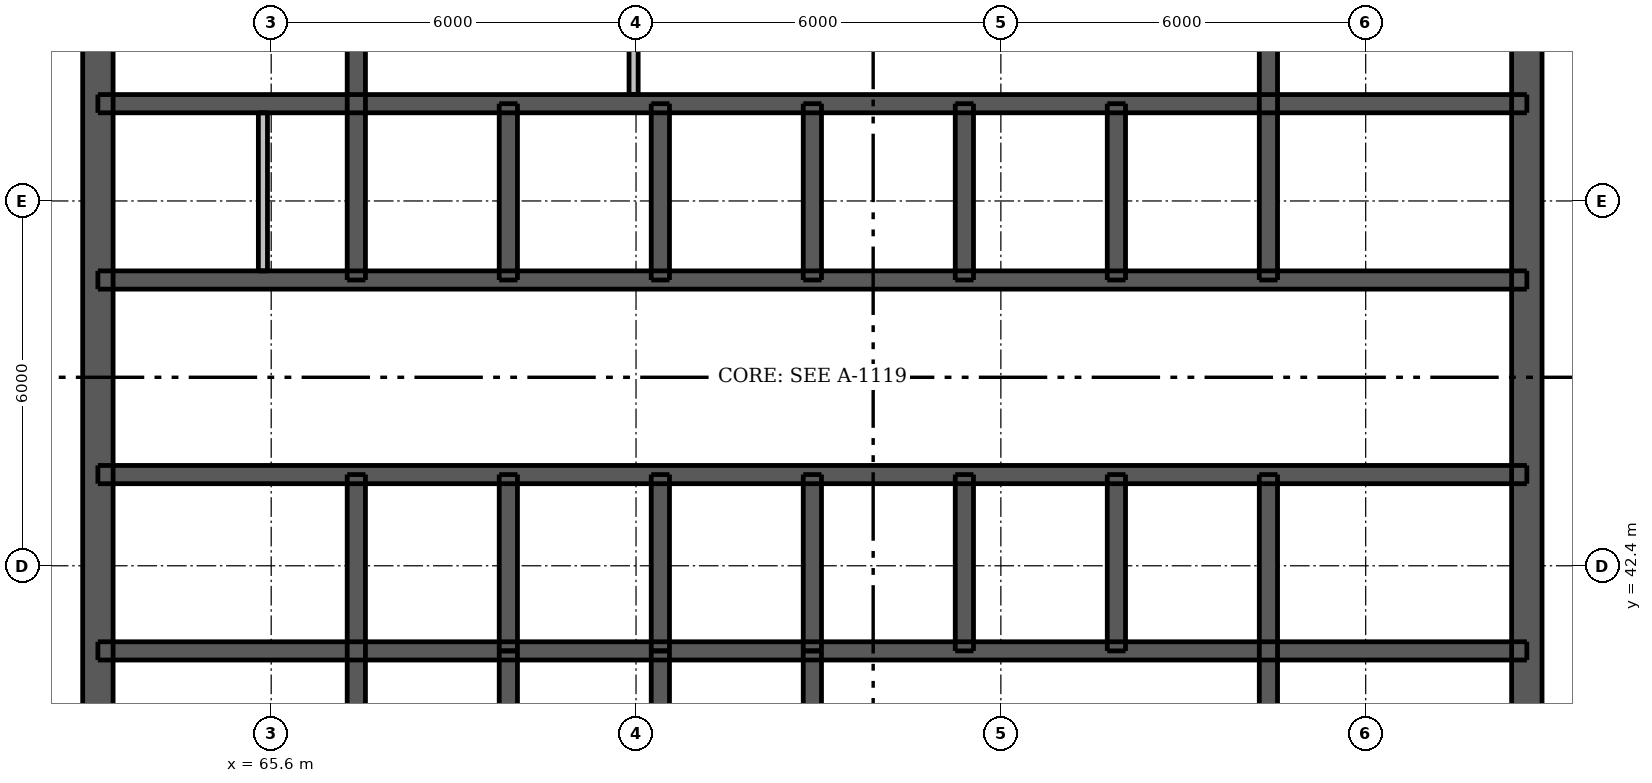
"""IFC4 building model, lengths in metres.
Left out: names, types, materials, properties, quantities, classifications, styles, units other than length and angle.
Written with IfcOpenShell. Run it as: python <this file> out.ifc"""

import sys

from ifc_helpers import new_model, si_unit, direction, frame, frame_2d, origin, place, context, subcontext, project, spatial, rectangle, extrude, element, fill, save


model = new_model("IFC4")
c1 = context("Model", 3, precision=1e-05, world=origin(), true_north=direction((0.0, 1.0)))
c2 = subcontext(c1, "Body", "Model", "MODEL_VIEW")
j1 = project(units=[si_unit("LENGTHUNIT", "METRE"), si_unit("PLANEANGLEUNIT", "RADIAN")], contexts=[c1])
p1 = place(None, origin())
s1 = spatial("IfcSite", under=j1, at=p1, CompositionType="ELEMENT")
p2 = place(p1, origin())
s2 = spatial("IfcBuilding", under=s1, at=p2, CompositionType="ELEMENT")
p3 = place(p2, frame((0.0, 0.0, 271.9)))
s3 = spatial("IfcBuildingStorey", under=s2, at=p3, CompositionType="ELEMENT", Elevation=271.9)
p4 = place(p3, frame((62.75, 33.5, 0.0), z_axis=(0.0, 0.0, 1.0), x_axis=(0.0, 1.0, 0.0)))
e1 = element("IfcWall", 1, at=p4, inside=s3, PredefinedType="SHEAR", context=c2, shape_type="SweptSolid", body=[
    extrude(rectangle(XDim=24.0, YDim=0.5, at=frame_2d((12.0, 0.0))), origin(), (0.0, 0.0, 1.0), 3.05),
])
p5 = place(p4, frame((11.2, 0.0, 0.0)))
e2 = element("IfcOpeningElement", 2, at=p5, cuts=e1, PredefinedType="OPENING", context=c2, shape_type="SweptSolid", body=[
    extrude(rectangle(XDim=1.6, YDim=2.1, at=frame_2d((0.8, 1.05))), frame((0.0, 0.26, 0.0), z_axis=(0.0, -1.0, 0.0), x_axis=(1.0, 0.0, 0.0)), (0.0, 0.0, 1.0), 0.52),
])
p6 = place(p3, frame((86.25, 33.5, 0.0), z_axis=(0.0, 0.0, 1.0), x_axis=(0.0, 1.0, 0.0)))
e3 = element("IfcWall", 3, at=p6, inside=s3, PredefinedType="SHEAR", context=c2, shape_type="SweptSolid", body=[
    extrude(rectangle(XDim=24.0, YDim=0.5, at=frame_2d((12.0, 0.0))), origin(), (0.0, 0.0, 1.0), 3.05),
])
p7 = place(p6, frame((11.2, 0.0, 0.0)))
e4 = element("IfcOpeningElement", 4, at=p7, cuts=e3, PredefinedType="OPENING", context=c2, shape_type="SweptSolid", body=[
    extrude(rectangle(XDim=1.6, YDim=2.1, at=frame_2d((0.8, 1.05))), frame((0.0, 0.26, 0.0), z_axis=(0.0, -1.0, 0.0), x_axis=(1.0, 0.0, 0.0)), (0.0, 0.0, 1.0), 0.52),
])
p8 = place(p3, frame((62.75, 41.0, 0.0), z_axis=(0.0, 0.0, 1.0), x_axis=(1.0, 0.0, 0.0)))
e5 = element("IfcWall", 5, at=p8, inside=s3, PredefinedType="SHEAR", context=c2, shape_type="SweptSolid", body=[
    extrude(rectangle(XDim=23.5, YDim=0.3, at=frame_2d((11.75, 0.0))), origin(), (0.0, 0.0, 1.0), 3.05),
])
p9 = place(p3, frame((62.75, 43.9, 0.0), z_axis=(0.0, 0.0, 1.0), x_axis=(1.0, 0.0, 0.0)))
e6 = element("IfcWall", 6, at=p9, inside=s3, PredefinedType="SHEAR", context=c2, shape_type="SweptSolid", body=[
    extrude(rectangle(XDim=23.5, YDim=0.3, at=frame_2d((11.75, 0.0))), origin(), (0.0, 0.0, 1.0), 3.05),
])
p10 = place(p9, frame((1.725, 0.0, 0.0)))
e7 = element("IfcOpeningElement", 7, at=p10, cuts=e6, PredefinedType="OPENING", context=c2, shape_type="SweptSolid", body=[
    extrude(rectangle(XDim=0.9, YDim=2.1, at=frame_2d((0.45, 1.05))), frame((0.0, 0.16, 0.0), z_axis=(0.0, -1.0, 0.0), x_axis=(1.0, 0.0, 0.0)), (0.0, 0.0, 1.0), 0.32),
])
p11 = place(p9, frame((20.875, 0.0, 0.0)))
e8 = element("IfcOpeningElement", 8, at=p11, cuts=e6, PredefinedType="OPENING", context=c2, shape_type="SweptSolid", body=[
    extrude(rectangle(XDim=0.9, YDim=2.1, at=frame_2d((0.45, 1.05))), frame((0.0, 0.16, 0.0), z_axis=(0.0, -1.0, 0.0), x_axis=(1.0, 0.0, 0.0)), (0.0, 0.0, 1.0), 0.32),
])
p12 = place(p9, frame((7.55, 0.0, 0.0)))
e9 = element("IfcOpeningElement", 9, at=p12, cuts=e6, PredefinedType="OPENING", context=c2, shape_type="SweptSolid", body=[
    extrude(rectangle(XDim=0.9, YDim=2.1, at=frame_2d((0.45, 1.05))), frame((0.0, 0.16, 0.0), z_axis=(0.0, -1.0, 0.0), x_axis=(1.0, 0.0, 0.0)), (0.0, 0.0, 1.0), 0.32),
])
p13 = place(p9, frame((10.05, 0.0, 0.0)))
e10 = element("IfcOpeningElement", 10, at=p13, cuts=e6, PredefinedType="OPENING", context=c2, shape_type="SweptSolid", body=[
    extrude(rectangle(XDim=0.9, YDim=2.1, at=frame_2d((0.45, 1.05))), frame((0.0, 0.16, 0.0), z_axis=(0.0, -1.0, 0.0), x_axis=(1.0, 0.0, 0.0)), (0.0, 0.0, 1.0), 0.32),
])
p14 = place(p9, frame((15.05, 0.0, 0.0)))
e11 = element("IfcOpeningElement", 11, at=p14, cuts=e6, PredefinedType="OPENING", context=c2, shape_type="SweptSolid", body=[
    extrude(rectangle(XDim=0.9, YDim=2.1, at=frame_2d((0.45, 1.05))), frame((0.0, 0.16, 0.0), z_axis=(0.0, -1.0, 0.0), x_axis=(1.0, 0.0, 0.0)), (0.0, 0.0, 1.0), 0.32),
])
p15 = place(p9, frame((17.55, 0.0, 0.0)))
e12 = element("IfcOpeningElement", 12, at=p15, cuts=e6, PredefinedType="OPENING", context=c2, shape_type="SweptSolid", body=[
    extrude(rectangle(XDim=0.9, YDim=2.1, at=frame_2d((0.45, 1.05))), frame((0.0, 0.16, 0.0), z_axis=(0.0, -1.0, 0.0), x_axis=(1.0, 0.0, 0.0)), (0.0, 0.0, 1.0), 0.32),
])
p16 = place(p3, frame((62.75, 47.1, 0.0), z_axis=(0.0, 0.0, 1.0), x_axis=(1.0, 0.0, 0.0)))
e13 = element("IfcWall", 13, at=p16, inside=s3, PredefinedType="SHEAR", context=c2, shape_type="SweptSolid", body=[
    extrude(rectangle(XDim=23.5, YDim=0.3, at=frame_2d((11.75, 0.0))), origin(), (0.0, 0.0, 1.0), 3.05),
])
p17 = place(p16, frame((1.032, 0.0, 0.0)))
e14 = element("IfcOpeningElement", 14, at=p17, cuts=e13, PredefinedType="OPENING", context=c2, shape_type="SweptSolid", body=[
    extrude(rectangle(XDim=0.9, YDim=2.1, at=frame_2d((0.45, 1.05))), frame((0.0, 0.16, 0.0), z_axis=(0.0, -1.0, 0.0), x_axis=(1.0, 0.0, 0.0)), (0.0, 0.0, 1.0), 0.32),
])
p18 = place(p16, frame((3.007, 0.0, 0.0)))
e15 = element("IfcOpeningElement", 15, at=p18, cuts=e13, PredefinedType="OPENING", context=c2, shape_type="SweptSolid", body=[
    extrude(rectangle(XDim=0.8, YDim=2.1, at=frame_2d((0.4, 1.05))), frame((0.0, 0.16, 0.0), z_axis=(0.0, -1.0, 0.0), x_axis=(1.0, 0.0, 0.0)), (0.0, 0.0, 1.0), 0.32),
])
p19 = place(p16, frame((20.875, 0.0, 0.0)))
e16 = element("IfcOpeningElement", 16, at=p19, cuts=e13, PredefinedType="OPENING", context=c2, shape_type="SweptSolid", body=[
    extrude(rectangle(XDim=0.9, YDim=2.1, at=frame_2d((0.45, 1.05))), frame((0.0, 0.16, 0.0), z_axis=(0.0, -1.0, 0.0), x_axis=(1.0, 0.0, 0.0)), (0.0, 0.0, 1.0), 0.32),
])
p20 = place(p16, frame((4.95, 0.0, 0.0)))
e17 = element("IfcOpeningElement", 17, at=p20, cuts=e13, PredefinedType="OPENING", context=c2, shape_type="SweptSolid", body=[
    extrude(rectangle(XDim=1.1, YDim=2.1, at=frame_2d((0.55, 1.05))), frame((0.0, 0.16, 0.0), z_axis=(0.0, -1.0, 0.0), x_axis=(1.0, 0.0, 0.0)), (0.0, 0.0, 1.0), 0.32),
])
p21 = place(p16, frame((7.45, 0.0, 0.0)))
e18 = element("IfcOpeningElement", 18, at=p21, cuts=e13, PredefinedType="OPENING", context=c2, shape_type="SweptSolid", body=[
    extrude(rectangle(XDim=1.1, YDim=2.1, at=frame_2d((0.55, 1.05))), frame((0.0, 0.16, 0.0), z_axis=(0.0, -1.0, 0.0), x_axis=(1.0, 0.0, 0.0)), (0.0, 0.0, 1.0), 0.32),
])
p22 = place(p16, frame((9.95, 0.0, 0.0)))
e19 = element("IfcOpeningElement", 19, at=p22, cuts=e13, PredefinedType="OPENING", context=c2, shape_type="SweptSolid", body=[
    extrude(rectangle(XDim=1.1, YDim=2.1, at=frame_2d((0.55, 1.05))), frame((0.0, 0.16, 0.0), z_axis=(0.0, -1.0, 0.0), x_axis=(1.0, 0.0, 0.0)), (0.0, 0.0, 1.0), 0.32),
])
p23 = place(p16, frame((12.45, 0.0, 0.0)))
e20 = element("IfcOpeningElement", 20, at=p23, cuts=e13, PredefinedType="OPENING", context=c2, shape_type="SweptSolid", body=[
    extrude(rectangle(XDim=1.1, YDim=2.1, at=frame_2d((0.55, 1.05))), frame((0.0, 0.16, 0.0), z_axis=(0.0, -1.0, 0.0), x_axis=(1.0, 0.0, 0.0)), (0.0, 0.0, 1.0), 0.32),
])
p24 = place(p16, frame((14.95, 0.0, 0.0)))
e21 = element("IfcOpeningElement", 21, at=p24, cuts=e13, PredefinedType="OPENING", context=c2, shape_type="SweptSolid", body=[
    extrude(rectangle(XDim=1.1, YDim=2.1, at=frame_2d((0.55, 1.05))), frame((0.0, 0.16, 0.0), z_axis=(0.0, -1.0, 0.0), x_axis=(1.0, 0.0, 0.0)), (0.0, 0.0, 1.0), 0.32),
])
p25 = place(p16, frame((17.45, 0.0, 0.0)))
e22 = element("IfcOpeningElement", 22, at=p25, cuts=e13, PredefinedType="OPENING", context=c2, shape_type="SweptSolid", body=[
    extrude(rectangle(XDim=1.1, YDim=2.1, at=frame_2d((0.55, 1.05))), frame((0.0, 0.16, 0.0), z_axis=(0.0, -1.0, 0.0), x_axis=(1.0, 0.0, 0.0)), (0.0, 0.0, 1.0), 0.32),
])
p26 = place(p3, frame((62.75, 50.0, 0.0), z_axis=(0.0, 0.0, 1.0), x_axis=(1.0, 0.0, 0.0)))
e23 = element("IfcWall", 23, at=p26, inside=s3, PredefinedType="SHEAR", context=c2, shape_type="SweptSolid", body=[
    extrude(rectangle(XDim=23.5, YDim=0.3, at=frame_2d((11.75, 0.0))), origin(), (0.0, 0.0, 1.0), 3.05),
])
p27 = place(p3, frame((67.0, 33.75, 0.0), z_axis=(0.0, 0.0, 1.0), x_axis=(0.0, 1.0, 0.0)))
e24 = element("IfcWall", 24, at=p27, inside=s3, PredefinedType="SHEAR", context=c2, shape_type="SweptSolid", body=[
    extrude(rectangle(XDim=10.15, YDim=0.3, at=frame_2d((5.075, 0.0))), origin(), (0.0, 0.0, 1.0), 3.05),
])
p28 = place(p27, frame((0.45, 0.0, 0.0)))
e25 = element("IfcOpeningElement", 25, at=p28, cuts=e24, PredefinedType="OPENING", context=c2, shape_type="SweptSolid", body=[
    extrude(rectangle(XDim=1.1, YDim=2.1, at=frame_2d((0.55, 1.05))), frame((0.0, 0.16, 0.0), z_axis=(0.0, -1.0, 0.0), x_axis=(1.0, 0.0, 0.0)), (0.0, 0.0, 1.0), 0.32),
])
for number, where, z_axis, x_axis in (
    (26, (67.0, 47.1, 0.0), (0.0, 0.0, 1.0), (0.0, 1.0, 0.0)),
    (27, (82.0, 33.75, 0.0), (0.0, 0.0, 1.0), (0.0, 1.0, 0.0)),
    (28, (82.0, 47.1, 0.0), (0.0, 0.0, 1.0), (0.0, 1.0, 0.0)),
):
    element("IfcWall", number, at=place(p3, frame(where, z_axis=z_axis, x_axis=x_axis)), inside=s3, PredefinedType="SHEAR", context=c2, shape_type="SweptSolid", body=[
        extrude(rectangle(XDim=10.15, YDim=0.3, at=frame_2d((5.075, 0.0))), origin(), (0.0, 0.0, 1.0), 3.05),
    ])
for number, where, z_axis, x_axis in (
    (29, (69.5, 41.0, 0.0), (0.0, 0.0, 1.0), (0.0, 1.0, 0.0)),
    (30, (69.5, 47.1, 0.0), (0.0, 0.0, 1.0), (0.0, 1.0, 0.0)),
    (31, (72.0, 41.0, 0.0), (0.0, 0.0, 1.0), (0.0, 1.0, 0.0)),
    (32, (72.0, 47.1, 0.0), (0.0, 0.0, 1.0), (0.0, 1.0, 0.0)),
    (33, (74.5, 41.0, 0.0), (0.0, 0.0, 1.0), (0.0, 1.0, 0.0)),
    (34, (74.5, 47.1, 0.0), (0.0, 0.0, 1.0), (0.0, 1.0, 0.0)),
    (35, (77.0, 41.0, 0.0), (0.0, 0.0, 1.0), (0.0, 1.0, 0.0)),
    (36, (77.0, 47.1, 0.0), (0.0, 0.0, 1.0), (0.0, 1.0, 0.0)),
    (37, (79.5, 41.0, 0.0), (0.0, 0.0, 1.0), (0.0, 1.0, 0.0)),
    (38, (79.5, 47.1, 0.0), (0.0, 0.0, 1.0), (0.0, 1.0, 0.0)),
    (39, (69.5, 38.1, 0.0), (0.0, 0.0, 1.0), (0.0, 1.0, 0.0)),
    (40, (72.0, 38.1, 0.0), (0.0, 0.0, 1.0), (0.0, 1.0, 0.0)),
    (41, (74.5, 38.1, 0.0), (0.0, 0.0, 1.0), (0.0, 1.0, 0.0)),
):
    element("IfcWall", number, at=place(p3, frame(where, z_axis=z_axis, x_axis=x_axis)), inside=s3, PredefinedType="SHEAR", context=c2, shape_type="SweptSolid", body=[
        extrude(rectangle(XDim=2.9, YDim=0.3, at=frame_2d((1.45, 0.0))), origin(), (0.0, 0.0, 1.0), 3.05),
    ])
p29 = place(p3, frame((65.464, 47.25, 0.0), z_axis=(0.0, 0.0, 1.0), x_axis=(0.0, 1.0, 0.0)))
e42 = element("IfcWall", 42, at=p29, inside=s3, PredefinedType="PLUMBINGWALL", context=c2, shape_type="SweptSolid", body=[
    extrude(rectangle(XDim=2.6, YDim=0.15, at=frame_2d((1.3, 0.0))), origin(), (0.0, 0.0, 1.0), 3.05),
])
p30 = place(p3, frame((71.56, 50.15, 0.0), z_axis=(0.0, 0.0, 1.0), x_axis=(0.0, 1.0, 0.0)))
e43 = element("IfcWall", 43, at=p30, inside=s3, PredefinedType="PLUMBINGWALL", context=c2, shape_type="SweptSolid", body=[
    extrude(rectangle(XDim=6.85, YDim=0.15, at=frame_2d((3.425, 0.0))), origin(), (0.0, 0.0, 1.0), 3.05),
])
p31 = place(p5, origin())
e44 = element("IfcDoor", 44, at=p31, inside=s3, OperationType="DOUBLE_DOOR_SINGLE_SWING", PredefinedType="DOOR", context=c2, shape_type="SweptSolid", body=[
    extrude(rectangle(XDim=1.6, YDim=2.1, at=frame_2d((0.8, 1.05))), frame((0.0, -0.188, 0.0), z_axis=(0.0, -1.0, 0.0), x_axis=(1.0, 0.0, 0.0)), (0.0, 0.0, 1.0), 0.05),
])
fill(e2, e44)
p32 = place(p7, origin())
e45 = element("IfcDoor", 45, at=p32, inside=s3, OperationType="DOUBLE_DOOR_SINGLE_SWING", PredefinedType="DOOR", context=c2, shape_type="SweptSolid", body=[
    extrude(rectangle(XDim=1.6, YDim=2.1, at=frame_2d((0.8, 1.05))), frame((0.0, 0.237, 0.0), z_axis=(0.0, -1.0, 0.0), x_axis=(1.0, 0.0, 0.0)), (0.0, 0.0, 1.0), 0.05),
])
fill(e4, e45)
p33 = place(p10, origin())
e46 = element("IfcDoor", 46, at=p33, inside=s3, OperationType="SINGLE_SWING_LEFT", PredefinedType="DOOR", context=c2, shape_type="SweptSolid", body=[
    extrude(rectangle(XDim=0.9, YDim=2.1, at=frame_2d((0.45, 1.05))), frame((0.0, -0.087, 0.0), z_axis=(0.0, -1.0, 0.0), x_axis=(1.0, 0.0, 0.0)), (0.0, 0.0, 1.0), 0.05),
])
fill(e7, e46)
p34 = place(p11, origin())
e47 = element("IfcDoor", 47, at=p34, inside=s3, OperationType="SINGLE_SWING_LEFT", PredefinedType="DOOR", context=c2, shape_type="SweptSolid", body=[
    extrude(rectangle(XDim=0.9, YDim=2.1, at=frame_2d((0.45, 1.05))), frame((0.0, -0.087, 0.0), z_axis=(0.0, -1.0, 0.0), x_axis=(1.0, 0.0, 0.0)), (0.0, 0.0, 1.0), 0.05),
])
fill(e8, e47)
p35 = place(p17, origin())
e48 = element("IfcDoor", 48, at=p35, inside=s3, OperationType="SINGLE_SWING_LEFT", PredefinedType="DOOR", context=c2, shape_type="SweptSolid", body=[
    extrude(rectangle(XDim=0.9, YDim=2.1, at=frame_2d((0.45, 1.05))), frame((0.0, 0.138, 0.0), z_axis=(0.0, -1.0, 0.0), x_axis=(1.0, 0.0, 0.0)), (0.0, 0.0, 1.0), 0.05),
])
fill(e14, e48)
p36 = place(p18, origin())
e49 = element("IfcDoor", 49, at=p36, inside=s3, OperationType="SINGLE_SWING_RIGHT", PredefinedType="DOOR", context=c2, shape_type="SweptSolid", body=[
    extrude(rectangle(XDim=0.8, YDim=2.1, at=frame_2d((0.4, 1.05))), frame((0.0, 0.138, 0.0), z_axis=(0.0, -1.0, 0.0), x_axis=(1.0, 0.0, 0.0)), (0.0, 0.0, 1.0), 0.05),
])
fill(e15, e49)
p37 = place(p19, origin())
e50 = element("IfcDoor", 50, at=p37, inside=s3, OperationType="SINGLE_SWING_LEFT", PredefinedType="DOOR", context=c2, shape_type="SweptSolid", body=[
    extrude(rectangle(XDim=0.9, YDim=2.1, at=frame_2d((0.45, 1.05))), frame((0.0, 0.138, 0.0), z_axis=(0.0, -1.0, 0.0), x_axis=(1.0, 0.0, 0.0)), (0.0, 0.0, 1.0), 0.05),
])
fill(e16, e50)
p38 = place(p12, origin())
e51 = element("IfcDoor", 51, at=p38, inside=s3, OperationType="SINGLE_SWING_LEFT", PredefinedType="DOOR", context=c2, shape_type="SweptSolid", body=[
    extrude(rectangle(XDim=0.9, YDim=2.1, at=frame_2d((0.45, 1.05))), frame((0.0, -0.087, 0.0), z_axis=(0.0, -1.0, 0.0), x_axis=(1.0, 0.0, 0.0)), (0.0, 0.0, 1.0), 0.05),
])
fill(e9, e51)
p39 = place(p13, origin())
e52 = element("IfcDoor", 52, at=p39, inside=s3, OperationType="SINGLE_SWING_RIGHT", PredefinedType="DOOR", context=c2, shape_type="SweptSolid", body=[
    extrude(rectangle(XDim=0.9, YDim=2.1, at=frame_2d((0.45, 1.05))), frame((0.0, -0.087, 0.0), z_axis=(0.0, -1.0, 0.0), x_axis=(1.0, 0.0, 0.0)), (0.0, 0.0, 1.0), 0.05),
])
fill(e10, e52)
p40 = place(p14, origin())
e53 = element("IfcDoor", 53, at=p40, inside=s3, OperationType="SINGLE_SWING_RIGHT", PredefinedType="DOOR", context=c2, shape_type="SweptSolid", body=[
    extrude(rectangle(XDim=0.9, YDim=2.1, at=frame_2d((0.45, 1.05))), frame((0.0, -0.087, 0.0), z_axis=(0.0, -1.0, 0.0), x_axis=(1.0, 0.0, 0.0)), (0.0, 0.0, 1.0), 0.05),
])
fill(e11, e53)
p41 = place(p15, origin())
e54 = element("IfcDoor", 54, at=p41, inside=s3, OperationType="SINGLE_SWING_LEFT", PredefinedType="DOOR", context=c2, shape_type="SweptSolid", body=[
    extrude(rectangle(XDim=0.9, YDim=2.1, at=frame_2d((0.45, 1.05))), frame((0.0, -0.087, 0.0), z_axis=(0.0, -1.0, 0.0), x_axis=(1.0, 0.0, 0.0)), (0.0, 0.0, 1.0), 0.05),
])
fill(e12, e54)
p42 = place(p20, origin())
e55 = element("IfcDoor", 55, at=p42, inside=s3, OperationType="DOUBLE_DOOR_SLIDING", PredefinedType="DOOR", context=c2, shape_type="SweptSolid", body=[
    extrude(rectangle(XDim=1.1, YDim=2.1, at=frame_2d((0.55, 1.05))), frame((0.0, 0.025, 0.0), z_axis=(0.0, -1.0, 0.0), x_axis=(1.0, 0.0, 0.0)), (0.0, 0.0, 1.0), 0.05),
])
fill(e17, e55)
p43 = place(p21, origin())
e56 = element("IfcDoor", 56, at=p43, inside=s3, OperationType="DOUBLE_DOOR_SLIDING", PredefinedType="DOOR", context=c2, shape_type="SweptSolid", body=[
    extrude(rectangle(XDim=1.1, YDim=2.1, at=frame_2d((0.55, 1.05))), frame((0.0, 0.025, 0.0), z_axis=(0.0, -1.0, 0.0), x_axis=(1.0, 0.0, 0.0)), (0.0, 0.0, 1.0), 0.05),
])
fill(e18, e56)
p44 = place(p22, origin())
e57 = element("IfcDoor", 57, at=p44, inside=s3, OperationType="DOUBLE_DOOR_SLIDING", PredefinedType="DOOR", context=c2, shape_type="SweptSolid", body=[
    extrude(rectangle(XDim=1.1, YDim=2.1, at=frame_2d((0.55, 1.05))), frame((0.0, 0.025, 0.0), z_axis=(0.0, -1.0, 0.0), x_axis=(1.0, 0.0, 0.0)), (0.0, 0.0, 1.0), 0.05),
])
fill(e19, e57)
p45 = place(p23, origin())
e58 = element("IfcDoor", 58, at=p45, inside=s3, OperationType="DOUBLE_DOOR_SLIDING", PredefinedType="DOOR", context=c2, shape_type="SweptSolid", body=[
    extrude(rectangle(XDim=1.1, YDim=2.1, at=frame_2d((0.55, 1.05))), frame((0.0, 0.025, 0.0), z_axis=(0.0, -1.0, 0.0), x_axis=(1.0, 0.0, 0.0)), (0.0, 0.0, 1.0), 0.05),
])
fill(e20, e58)
p46 = place(p24, origin())
e59 = element("IfcDoor", 59, at=p46, inside=s3, OperationType="DOUBLE_DOOR_SLIDING", PredefinedType="DOOR", context=c2, shape_type="SweptSolid", body=[
    extrude(rectangle(XDim=1.1, YDim=2.1, at=frame_2d((0.55, 1.05))), frame((0.0, 0.025, 0.0), z_axis=(0.0, -1.0, 0.0), x_axis=(1.0, 0.0, 0.0)), (0.0, 0.0, 1.0), 0.05),
])
fill(e21, e59)
p47 = place(p25, origin())
e60 = element("IfcDoor", 60, at=p47, inside=s3, OperationType="DOUBLE_DOOR_SLIDING", PredefinedType="DOOR", context=c2, shape_type="SweptSolid", body=[
    extrude(rectangle(XDim=1.1, YDim=2.1, at=frame_2d((0.55, 1.05))), frame((0.0, 0.025, 0.0), z_axis=(0.0, -1.0, 0.0), x_axis=(1.0, 0.0, 0.0)), (0.0, 0.0, 1.0), 0.05),
])
fill(e22, e60)
save(model, sys.argv[1])
